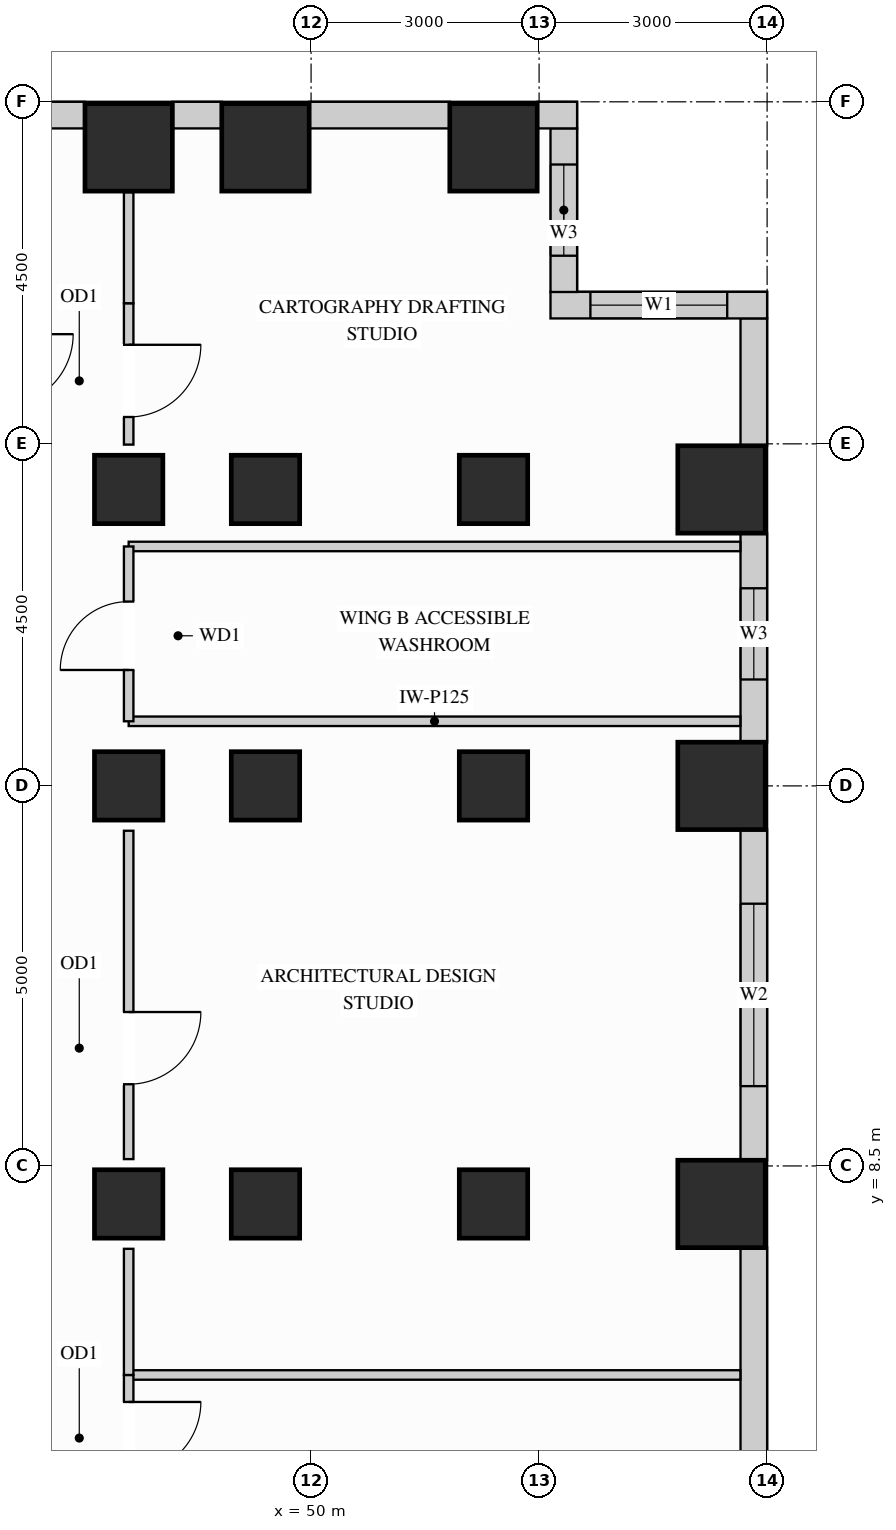
"""IFC4 building model, lengths in metres.
Left out: names, types, materials, properties, quantities, classifications, styles, units other than length and angle.
Written with IfcOpenShell. Run it as: python <this file> out.ifc"""

import sys

from ifc_helpers import new_model, si_unit, direction, frame, frame_2d, origin, origin_2d, place, context, subcontext, project, spatial, rectangle, extrude, source, transform, mapped, element, fill, save


model = new_model("IFC4")
c1 = context("Model", 3, precision=1e-05, world=origin(), true_north=direction((0.0, 1.0)))
c2 = subcontext(c1, "Body", "Model", "MODEL_VIEW")
j1 = project(units=[si_unit("LENGTHUNIT", "METRE"), si_unit("PLANEANGLEUNIT", "RADIAN")], contexts=[c1])
p1 = place(None, origin())
s1 = spatial("IfcSite", under=j1, at=p1, CompositionType="ELEMENT")
p2 = place(p1, origin())
s2 = spatial("IfcBuilding", under=s1, at=p2, CompositionType="ELEMENT")
p3 = place(p2, frame((0.0, 0.0, 84.6)))
s3 = spatial("IfcBuildingStorey", under=s2, at=p3, CompositionType="ELEMENT", Elevation=84.6)
m1 = source(origin(), c2, "Body", "SweptSolid", [
    extrude(rectangle(XDim=0.9, YDim=0.9, at=origin_2d()), origin(), (0.0, 0.0, 1.0), 3.38),
])
for number, where, z_axis, x_axis in (
    (1, (47.6, 13.5, 0.0), (0.0, 0.0, 1.0), (1.0, 0.0, 0.0)),
    (2, (47.6, 8.0, 0.0), (0.0, 0.0, 1.0), (1.0, 0.0, 0.0)),
    (3, (47.6, 17.4, 0.0), (0.0, 0.0, 1.0), (1.0, 0.0, 0.0)),
    (4, (49.4, 13.5, 0.0), (0.0, 0.0, 1.0), (1.0, 0.0, 0.0)),
    (5, (49.4, 17.4, 0.0), (0.0, 0.0, 1.0), (1.0, 0.0, 0.0)),
    (6, (49.4, 8.0, 0.0), (0.0, 0.0, 1.0), (1.0, 0.0, 0.0)),
    (7, (52.4, 13.5, 0.0), (0.0, 0.0, 1.0), (1.0, 0.0, 0.0)),
    (8, (52.4, 17.4, 0.0), (0.0, 0.0, 1.0), (1.0, 0.0, 0.0)),
    (9, (52.4, 8.0, 0.0), (0.0, 0.0, 1.0), (1.0, 0.0, 0.0)),
):
    element("IfcColumn", number, at=place(p3, frame(where, z_axis=z_axis, x_axis=x_axis)), inside=s3, PredefinedType="COLUMN", context=c2, shape_type="MappedRepresentation", body=[
        mapped(m1, transform((0.0, 0.0, 0.0), x_axis=(1.0, 0.0, 0.0), y_axis=(0.0, 1.0, 0.0), z_axis=(0.0, 0.0, 1.0))),
    ])
m2 = source(origin(), c2, "Body", "SweptSolid", [
    extrude(rectangle(XDim=1.15, YDim=1.15, at=origin_2d()), origin(), (0.0, 0.0, 1.0), 3.38),
])
for number, where, z_axis, x_axis in (
    (10, (47.6, 21.9, 0.0), (0.0, 0.0, 1.0), (1.0, 0.0, 0.0)),
    (11, (49.4, 21.9, 0.0), (0.0, 0.0, 1.0), (1.0, 0.0, 0.0)),
    (12, (52.4, 21.9, 0.0), (0.0, 0.0, 1.0), (1.0, 0.0, 0.0)),
    (13, (55.4, 13.5, 0.0), (0.0, 0.0, 1.0), (1.0, 0.0, 0.0)),
    (14, (55.4, 17.4, 0.0), (0.0, 0.0, 1.0), (1.0, 0.0, 0.0)),
    (15, (55.4, 8.0, 0.0), (0.0, 0.0, 1.0), (1.0, 0.0, 0.0)),
):
    element("IfcColumn", number, at=place(p3, frame(where, z_axis=z_axis, x_axis=x_axis)), inside=s3, PredefinedType="COLUMN", context=c2, shape_type="MappedRepresentation", body=[
        mapped(m2, transform((0.0, 0.0, 0.0), x_axis=(1.0, 0.0, 0.0), y_axis=(0.0, 1.0, 0.0), z_axis=(0.0, 0.0, 1.0))),
    ])
m3 = source(origin(), c2, "Body", "SweptSolid", [
    extrude(rectangle(XDim=3.354, YDim=0.35, at=frame_2d((1.677, 0.0))), origin(), (0.0, 0.0, 1.0), 3.365),
])
p4 = place(p3, frame((55.825, 4.073, 0.0), z_axis=(0.0, 0.0, 1.0), x_axis=(0.0, 1.0, 0.0)))
e16 = element("IfcWall", 16, at=p4, inside=s3, PredefinedType="SOLIDWALL", context=c2, shape_type="MappedRepresentation", body=[
    mapped(m3, transform((0.0, 0.0, 0.0), x_axis=(1.0, 0.0, 0.0), y_axis=(0.0, 1.0, 0.0), z_axis=(0.0, 0.0, 1.0))),
])
p5 = place(p3, frame((55.825, 8.573, 0.0), z_axis=(0.0, 0.0, 1.0), x_axis=(0.0, 1.0, 0.0)))
e17 = element("IfcWall", 17, at=p5, inside=s3, PredefinedType="SOLIDWALL", context=c2, shape_type="SweptSolid", body=[
    extrude(rectangle(XDim=4.354, YDim=0.35, at=frame_2d((2.177, 0.0))), origin(), (0.0, 0.0, 1.0), 3.365),
])
p6 = place(p5, frame((0.977, 0.0, 0.78)))
e18 = element("IfcOpeningElement", 18, at=p6, cuts=e17, PredefinedType="OPENING", context=c2, shape_type="SweptSolid", body=[
    extrude(rectangle(XDim=2.4, YDim=2.1, at=frame_2d((1.2, 1.05))), frame((0.0, 0.185, 0.0), z_axis=(0.0, -1.0, 0.0), x_axis=(1.0, 0.0, 0.0)), (0.0, 0.0, 1.0), 0.37),
])
p7 = place(p3, frame((55.825, 14.073, 0.0), z_axis=(0.0, 0.0, 1.0), x_axis=(0.0, 1.0, 0.0)))
e19 = element("IfcWall", 19, at=p7, inside=s3, PredefinedType="SOLIDWALL", context=c2, shape_type="SweptSolid", body=[
    extrude(rectangle(XDim=2.754, YDim=0.35, at=frame_2d((1.377, 0.0))), origin(), (0.0, 0.0, 1.0), 3.365),
])
p8 = place(p7, frame((0.827, 0.0, 0.78)))
e20 = element("IfcOpeningElement", 20, at=p8, cuts=e19, PredefinedType="OPENING", context=c2, shape_type="SweptSolid", body=[
    extrude(rectangle(XDim=1.2, YDim=2.1, at=frame_2d((0.6, 1.05))), frame((0.0, 0.185, 0.0), z_axis=(0.0, -1.0, 0.0), x_axis=(1.0, 0.0, 0.0)), (0.0, 0.0, 1.0), 0.37),
])
m4 = source(origin(), c2, "Body", "SweptSolid", [
    extrude(rectangle(XDim=1.679, YDim=0.35, at=frame_2d((0.84, 0.0))), origin(), (0.0, 0.0, 1.0), 3.365),
])
p9 = place(p3, frame((55.825, 17.973, 0.0), z_axis=(0.0, 0.0, 1.0), x_axis=(0.0, 1.0, 0.0)))
e21 = element("IfcWall", 21, at=p9, inside=s3, PredefinedType="SOLIDWALL", context=c2, shape_type="MappedRepresentation", body=[
    mapped(m4, transform((0.0, 0.0, 0.0), x_axis=(1.0, 0.0, 0.0), y_axis=(0.0, 1.0, 0.0), z_axis=(0.0, 0.0, 1.0))),
])
p10 = place(p3, frame((56.0, 19.825, 0.0), z_axis=(0.0, 0.0, 1.0), x_axis=(-1.0, 0.0, 0.0)))
e22 = element("IfcWall", 22, at=p10, inside=s3, PredefinedType="SOLIDWALL", context=c2, shape_type="SweptSolid", body=[
    extrude(rectangle(XDim=2.85, YDim=0.35, at=frame_2d((1.425, 0.0))), origin(), (0.0, 0.0, 1.0), 3.365),
])
p11 = place(p10, frame((0.525, 0.0, 0.78)))
e23 = element("IfcOpeningElement", 23, at=p11, cuts=e22, PredefinedType="OPENING", context=c2, shape_type="SweptSolid", body=[
    extrude(rectangle(XDim=1.8, YDim=2.1, at=frame_2d((0.9, 1.05))), frame((0.0, 0.185, 0.0), z_axis=(0.0, -1.0, 0.0), x_axis=(1.0, 0.0, 0.0)), (0.0, 0.0, 1.0), 0.37),
])
p12 = place(p3, frame((53.325, 19.998, 0.0), z_axis=(0.0, 0.0, 1.0), x_axis=(0.0, 1.0, 0.0)))
e24 = element("IfcWall", 24, at=p12, inside=s3, PredefinedType="SOLIDWALL", context=c2, shape_type="SweptSolid", body=[
    extrude(rectangle(XDim=2.154, YDim=0.35, at=frame_2d((1.077, 0.0))), origin(), (0.0, 0.0, 1.0), 3.365),
])
p13 = place(p12, frame((0.477, 0.0, 0.78)))
e25 = element("IfcOpeningElement", 25, at=p13, cuts=e24, PredefinedType="OPENING", context=c2, shape_type="SweptSolid", body=[
    extrude(rectangle(XDim=1.2, YDim=2.1, at=frame_2d((0.6, 1.05))), frame((0.0, 0.185, 0.0), z_axis=(0.0, -1.0, 0.0), x_axis=(1.0, 0.0, 0.0)), (0.0, 0.0, 1.0), 0.37),
])
m5 = source(origin(), c2, "Body", "SweptSolid", [
    extrude(rectangle(XDim=0.527, YDim=0.35, at=frame_2d((0.264, 0.0))), origin(), (0.0, 0.0, 1.0), 3.365),
])
p14 = place(p3, frame((53.5, 22.325, 0.0), z_axis=(0.0, 0.0, 1.0), x_axis=(-1.0, 0.0, 0.0)))
e26 = element("IfcWall", 26, at=p14, inside=s3, PredefinedType="SOLIDWALL", context=c2, shape_type="MappedRepresentation", body=[
    mapped(m5, transform((0.0, 0.0, 0.0), x_axis=(1.0, 0.0, 0.0), y_axis=(0.0, 1.0, 0.0), z_axis=(0.0, 0.0, 1.0))),
])
m6 = source(origin(), c2, "Body", "SweptSolid", [
    extrude(rectangle(XDim=1.854, YDim=0.35, at=frame_2d((0.927, 0.0))), origin(), (0.0, 0.0, 1.0), 3.365),
])
p15 = place(p3, frame((51.827, 22.325, 0.0), z_axis=(0.0, 0.0, 1.0), x_axis=(-1.0, 0.0, 0.0)))
e27 = element("IfcWall", 27, at=p15, inside=s3, PredefinedType="SOLIDWALL", context=c2, shape_type="MappedRepresentation", body=[
    mapped(m6, transform((0.0, 0.0, 0.0), x_axis=(1.0, 0.0, 0.0), y_axis=(0.0, 1.0, 0.0), z_axis=(0.0, 0.0, 1.0))),
])
m7 = source(origin(), c2, "Body", "SweptSolid", [
    extrude(rectangle(XDim=0.654, YDim=0.35, at=frame_2d((0.327, 0.0))), origin(), (0.0, 0.0, 1.0), 3.365),
])
p16 = place(p3, frame((48.827, 22.325, 0.0), z_axis=(0.0, 0.0, 1.0), x_axis=(-1.0, 0.0, 0.0)))
e28 = element("IfcWall", 28, at=p16, inside=s3, PredefinedType="SOLIDWALL", context=c2, shape_type="MappedRepresentation", body=[
    mapped(m7, transform((0.0, 0.0, 0.0), x_axis=(1.0, 0.0, 0.0), y_axis=(0.0, 1.0, 0.0), z_axis=(0.0, 0.0, 1.0))),
])
p17 = place(p3, frame((47.027, 22.325, 0.0), z_axis=(0.0, 0.0, 1.0), x_axis=(-1.0, 0.0, 0.0)))
e29 = element("IfcWall", 29, at=p17, inside=s3, PredefinedType="SOLIDWALL", context=c2, shape_type="SweptSolid", body=[
    extrude(rectangle(XDim=6.454, YDim=0.35, at=frame_2d((3.227, 0.0))), origin(), (0.0, 0.0, 1.0), 3.365),
])
p18 = place(p17, frame((1.749, 0.0, 0.78)))
e30 = element("IfcOpeningElement", 30, at=p18, cuts=e29, PredefinedType="OPENING", context=c2, shape_type="SweptSolid", body=[
    extrude(rectangle(XDim=1.8, YDim=2.1, at=frame_2d((0.9, 1.05))), frame((0.0, 0.185, 0.0), z_axis=(0.0, -1.0, 0.0), x_axis=(1.0, 0.0, 0.0)), (0.0, 0.0, 1.0), 0.37),
])
p19 = place(p17, frame((3.942, 0.0, 0.78)))
e31 = element("IfcOpeningElement", 31, at=p19, cuts=e29, PredefinedType="OPENING", context=c2, shape_type="SweptSolid", body=[
    extrude(rectangle(XDim=1.8, YDim=2.1, at=frame_2d((0.9, 1.05))), frame((0.0, 0.185, 0.0), z_axis=(0.0, -1.0, 0.0), x_axis=(1.0, 0.0, 0.0)), (0.0, 0.0, 1.0), 0.37),
])
m8 = source(origin(), c2, "Body", "SweptSolid", [
    extrude(rectangle(XDim=8.048, YDim=0.125, at=frame_2d((4.024, 0.0))), origin(), (0.0, 0.0, 1.0), 3.365),
])
p20 = place(p3, frame((47.6, 14.35, 0.0), z_axis=(0.0, 0.0, 1.0), x_axis=(1.0, 0.0, 0.0)))
e32 = element("IfcWall", 32, at=p20, inside=s3, PredefinedType="PARTITIONING", context=c2, shape_type="MappedRepresentation", body=[
    mapped(m8, transform((0.0, 0.0, 0.0), x_axis=(1.0, 0.0, 0.0), y_axis=(0.0, 1.0, 0.0), z_axis=(0.0, 0.0, 1.0))),
])
m9 = source(origin(), c2, "Body", "SweptSolid", [
    extrude(rectangle(XDim=8.048, YDim=0.125, at=frame_2d((4.024, 0.0))), origin(), (0.0, 0.0, 1.0), 2.677),
])
p21 = place(p3, frame((47.6, 16.65, 0.0), z_axis=(0.0, 0.0, 1.0), x_axis=(1.0, 0.0, 0.0)))
e33 = element("IfcWall", 33, at=p21, inside=s3, PredefinedType="PARTITIONING", context=c2, shape_type="MappedRepresentation", body=[
    mapped(m9, transform((0.0, 0.0, 0.0), x_axis=(1.0, 0.0, 0.0), y_axis=(0.0, 1.0, 0.0), z_axis=(0.0, 0.0, 1.0))),
])
p22 = place(p3, frame((47.6, 5.75, 0.0), z_axis=(0.0, 0.0, 1.0), x_axis=(1.0, 0.0, 0.0)))
e34 = element("IfcWall", 34, at=p22, inside=s3, PredefinedType="PARTITIONING", context=c2, shape_type="MappedRepresentation", body=[
    mapped(m8, transform((0.0, 0.0, 0.0), x_axis=(1.0, 0.0, 0.0), y_axis=(0.0, 1.0, 0.0), z_axis=(0.0, 0.0, 1.0))),
])
p23 = place(p3, frame((47.6, 4.09, 0.0), z_axis=(0.0, 0.0, 1.0), x_axis=(0.0, 1.0, 0.0)))
e35 = element("IfcWall", 35, at=p23, inside=s3, PredefinedType="PARTITIONING", context=c2, shape_type="SweptSolid", body=[
    extrude(rectangle(XDim=1.66, YDim=0.125, at=frame_2d((0.83, 0.0))), origin(), (0.0, 0.0, 1.0), 2.677),
])
p24 = place(p23, frame((0.355, 0.0, 0.0)))
e36 = element("IfcOpeningElement", 36, at=p24, cuts=e35, PredefinedType="OPENING", context=c2, shape_type="SweptSolid", body=[
    extrude(rectangle(XDim=0.95, YDim=2.15, at=frame_2d((0.475, 1.075))), frame((0.0, 0.073, 0.0), z_axis=(0.0, -1.0, 0.0), x_axis=(1.0, 0.0, 0.0)), (0.0, 0.0, 1.0), 0.145),
])
m10 = source(origin(), c2, "Body", "SweptSolid", [
    extrude(rectangle(XDim=1.66, YDim=0.125, at=frame_2d((0.83, 0.0))), origin(), (0.0, 0.0, 1.0), 2.677),
])
p25 = place(p3, frame((47.6, 5.75, 0.0), z_axis=(0.0, 0.0, 1.0), x_axis=(0.0, 1.0, 0.0)))
e37 = element("IfcWall", 37, at=p25, inside=s3, PredefinedType="PARTITIONING", context=c2, shape_type="MappedRepresentation", body=[
    mapped(m10, transform((0.0, 0.0, 0.0), x_axis=(1.0, 0.0, 0.0), y_axis=(0.0, 1.0, 0.0), z_axis=(0.0, 0.0, 1.0))),
])
p26 = place(p3, frame((47.6, 8.59, 0.0), z_axis=(0.0, 0.0, 1.0), x_axis=(0.0, 1.0, 0.0)))
e38 = element("IfcWall", 38, at=p26, inside=s3, PredefinedType="PARTITIONING", context=c2, shape_type="SweptSolid", body=[
    extrude(rectangle(XDim=4.32, YDim=0.125, at=frame_2d((2.16, 0.0))), origin(), (0.0, 0.0, 1.0), 2.677),
])
p27 = place(p26, frame((0.985, 0.0, 0.0)))
e39 = element("IfcOpeningElement", 39, at=p27, cuts=e38, PredefinedType="OPENING", context=c2, shape_type="SweptSolid", body=[
    extrude(rectangle(XDim=0.95, YDim=2.15, at=frame_2d((0.475, 1.075))), frame((0.0, 0.073, 0.0), z_axis=(0.0, -1.0, 0.0), x_axis=(1.0, 0.0, 0.0)), (0.0, 0.0, 1.0), 0.145),
])
p28 = place(p3, frame((47.6, 17.99, 0.0), z_axis=(0.0, 0.0, 1.0), x_axis=(0.0, 1.0, 0.0)))
e40 = element("IfcWall", 40, at=p28, inside=s3, PredefinedType="PARTITIONING", context=c2, shape_type="SweptSolid", body=[
    extrude(rectangle(XDim=1.86, YDim=0.125, at=frame_2d((0.93, 0.0))), origin(), (0.0, 0.0, 1.0), 2.677),
])
p29 = place(p28, frame((0.363, 0.0, 0.0)))
e41 = element("IfcOpeningElement", 41, at=p29, cuts=e40, PredefinedType="OPENING", context=c2, shape_type="SweptSolid", body=[
    extrude(rectangle(XDim=0.95, YDim=2.15, at=frame_2d((0.475, 1.075))), frame((0.0, 0.073, 0.0), z_axis=(0.0, -1.0, 0.0), x_axis=(1.0, 0.0, 0.0)), (0.0, 0.0, 1.0), 0.145),
])
m11 = source(origin(), c2, "Body", "SweptSolid", [
    extrude(rectangle(XDim=1.46, YDim=0.125, at=frame_2d((0.73, 0.0))), origin(), (0.0, 0.0, 1.0), 2.677),
])
p30 = place(p3, frame((47.6, 19.85, 0.0), z_axis=(0.0, 0.0, 1.0), x_axis=(0.0, 1.0, 0.0)))
e42 = element("IfcWall", 42, at=p30, inside=s3, PredefinedType="PARTITIONING", context=c2, shape_type="MappedRepresentation", body=[
    mapped(m11, transform((0.0, 0.0, 0.0), x_axis=(1.0, 0.0, 0.0), y_axis=(0.0, 1.0, 0.0), z_axis=(0.0, 0.0, 1.0))),
])
p31 = place(p3, frame((47.6, 14.35, 0.0), z_axis=(0.0, 0.0, 1.0), x_axis=(0.0, 1.0, 0.0)))
e43 = element("IfcWall", 43, at=p31, inside=s3, PredefinedType="PARTITIONING", context=c2, shape_type="SweptSolid", body=[
    extrude(rectangle(XDim=2.3, YDim=0.125, at=frame_2d((1.15, 0.0))), origin(), (0.0, 0.0, 1.0), 2.677),
])
p32 = place(p31, frame((0.675, 0.0, 0.0)))
e44 = element("IfcOpeningElement", 44, at=p32, cuts=e43, PredefinedType="OPENING", context=c2, shape_type="SweptSolid", body=[
    extrude(rectangle(XDim=0.9, YDim=2.15, at=frame_2d((0.45, 1.075))), frame((0.0, 0.073, 0.0), z_axis=(0.0, -1.0, 0.0), x_axis=(1.0, 0.0, 0.0)), (0.0, 0.0, 1.0), 0.145),
])
m12 = source(origin(), c2, "Body", "SweptSolid", [
    extrude(rectangle(XDim=0.95, YDim=2.15, at=frame_2d((0.475, 1.075))), frame((0.0, 0.025, 0.0), z_axis=(0.0, -1.0, 0.0), x_axis=(1.0, 0.0, 0.0)), (0.0, 0.0, 1.0), 0.05),
])
p33 = place(p24, origin())
e45 = element("IfcDoor", 45, at=p33, inside=s3, OperationType="SINGLE_SWING_RIGHT", PredefinedType="DOOR", context=c2, shape_type="MappedRepresentation", body=[
    mapped(m12, transform((0.0, 0.0, 0.0), x_axis=(1.0, 0.0, 0.0), y_axis=(0.0, 1.0, 0.0), z_axis=(0.0, 0.0, 1.0))),
])
fill(e36, e45)
p34 = place(p27, origin())
e46 = element("IfcDoor", 46, at=p34, inside=s3, OperationType="SINGLE_SWING_RIGHT", PredefinedType="DOOR", context=c2, shape_type="MappedRepresentation", body=[
    mapped(m12, transform((0.0, 0.0, 0.0), x_axis=(1.0, 0.0, 0.0), y_axis=(0.0, 1.0, 0.0), z_axis=(0.0, 0.0, 1.0))),
])
fill(e39, e46)
p35 = place(p29, origin())
e47 = element("IfcDoor", 47, at=p35, inside=s3, OperationType="SINGLE_SWING_RIGHT", PredefinedType="DOOR", context=c2, shape_type="MappedRepresentation", body=[
    mapped(m12, transform((0.0, 0.0, 0.0), x_axis=(1.0, 0.0, 0.0), y_axis=(0.0, 1.0, 0.0), z_axis=(0.0, 0.0, 1.0))),
])
fill(e41, e47)
m13 = source(origin(), c2, "Body", "SweptSolid", [
    extrude(rectangle(XDim=0.9, YDim=2.15, at=frame_2d((0.45, 1.075))), frame((0.0, 0.025, 0.0), z_axis=(0.0, -1.0, 0.0), x_axis=(1.0, 0.0, 0.0)), (0.0, 0.0, 1.0), 0.05),
])
p36 = place(p32, origin())
e48 = element("IfcDoor", 48, at=p36, inside=s3, OperationType="SINGLE_SWING_LEFT", PredefinedType="DOOR", context=c2, shape_type="MappedRepresentation", body=[
    mapped(m13, transform((0.0, 0.0, 0.0), x_axis=(1.0, 0.0, 0.0), y_axis=(0.0, 1.0, 0.0), z_axis=(0.0, 0.0, 1.0))),
])
fill(e44, e48)
m14 = source(origin(), c2, "Body", "SweptSolid", [
    extrude(rectangle(XDim=1.8, YDim=2.1, at=frame_2d((0.9, 1.05))), frame((0.0, 0.03, 0.0), z_axis=(0.0, -1.0, 0.0), x_axis=(1.0, 0.0, 0.0)), (0.0, 0.0, 1.0), 0.06),
])
p37 = place(p11, origin())
e49 = element("IfcWindow", 49, at=p37, inside=s3, PartitioningType="SINGLE_PANEL", PredefinedType="WINDOW", context=c2, shape_type="MappedRepresentation", body=[
    mapped(m14, transform((0.0, 0.0, 0.0), x_axis=(1.0, 0.0, 0.0), y_axis=(0.0, 1.0, 0.0), z_axis=(0.0, 0.0, 1.0))),
])
fill(e23, e49)
m15 = source(origin(), c2, "Body", "SweptSolid", [
    extrude(rectangle(XDim=2.4, YDim=2.1, at=frame_2d((1.2, 1.05))), frame((0.0, 0.03, 0.0), z_axis=(0.0, -1.0, 0.0), x_axis=(1.0, 0.0, 0.0)), (0.0, 0.0, 1.0), 0.06),
])
p38 = place(p6, origin())
e50 = element("IfcWindow", 50, at=p38, inside=s3, PartitioningType="SINGLE_PANEL", PredefinedType="WINDOW", context=c2, shape_type="MappedRepresentation", body=[
    mapped(m15, transform((0.0, 0.0, 0.0), x_axis=(1.0, 0.0, 0.0), y_axis=(0.0, 1.0, 0.0), z_axis=(0.0, 0.0, 1.0))),
])
fill(e18, e50)
m16 = source(origin(), c2, "Body", "SweptSolid", [
    extrude(rectangle(XDim=1.2, YDim=2.1, at=frame_2d((0.6, 1.05))), frame((0.0, 0.03, 0.0), z_axis=(0.0, -1.0, 0.0), x_axis=(1.0, 0.0, 0.0)), (0.0, 0.0, 1.0), 0.06),
])
p39 = place(p8, origin())
e51 = element("IfcWindow", 51, at=p39, inside=s3, PartitioningType="SINGLE_PANEL", PredefinedType="WINDOW", context=c2, shape_type="MappedRepresentation", body=[
    mapped(m16, transform((0.0, 0.0, 0.0), x_axis=(1.0, 0.0, 0.0), y_axis=(0.0, 1.0, 0.0), z_axis=(0.0, 0.0, 1.0))),
])
fill(e20, e51)
p40 = place(p13, origin())
e52 = element("IfcWindow", 52, at=p40, inside=s3, PartitioningType="SINGLE_PANEL", PredefinedType="WINDOW", context=c2, shape_type="MappedRepresentation", body=[
    mapped(m16, transform((0.0, 0.0, 0.0), x_axis=(1.0, 0.0, 0.0), y_axis=(0.0, 1.0, 0.0), z_axis=(0.0, 0.0, 1.0))),
])
fill(e25, e52)
save(model, sys.argv[1])
